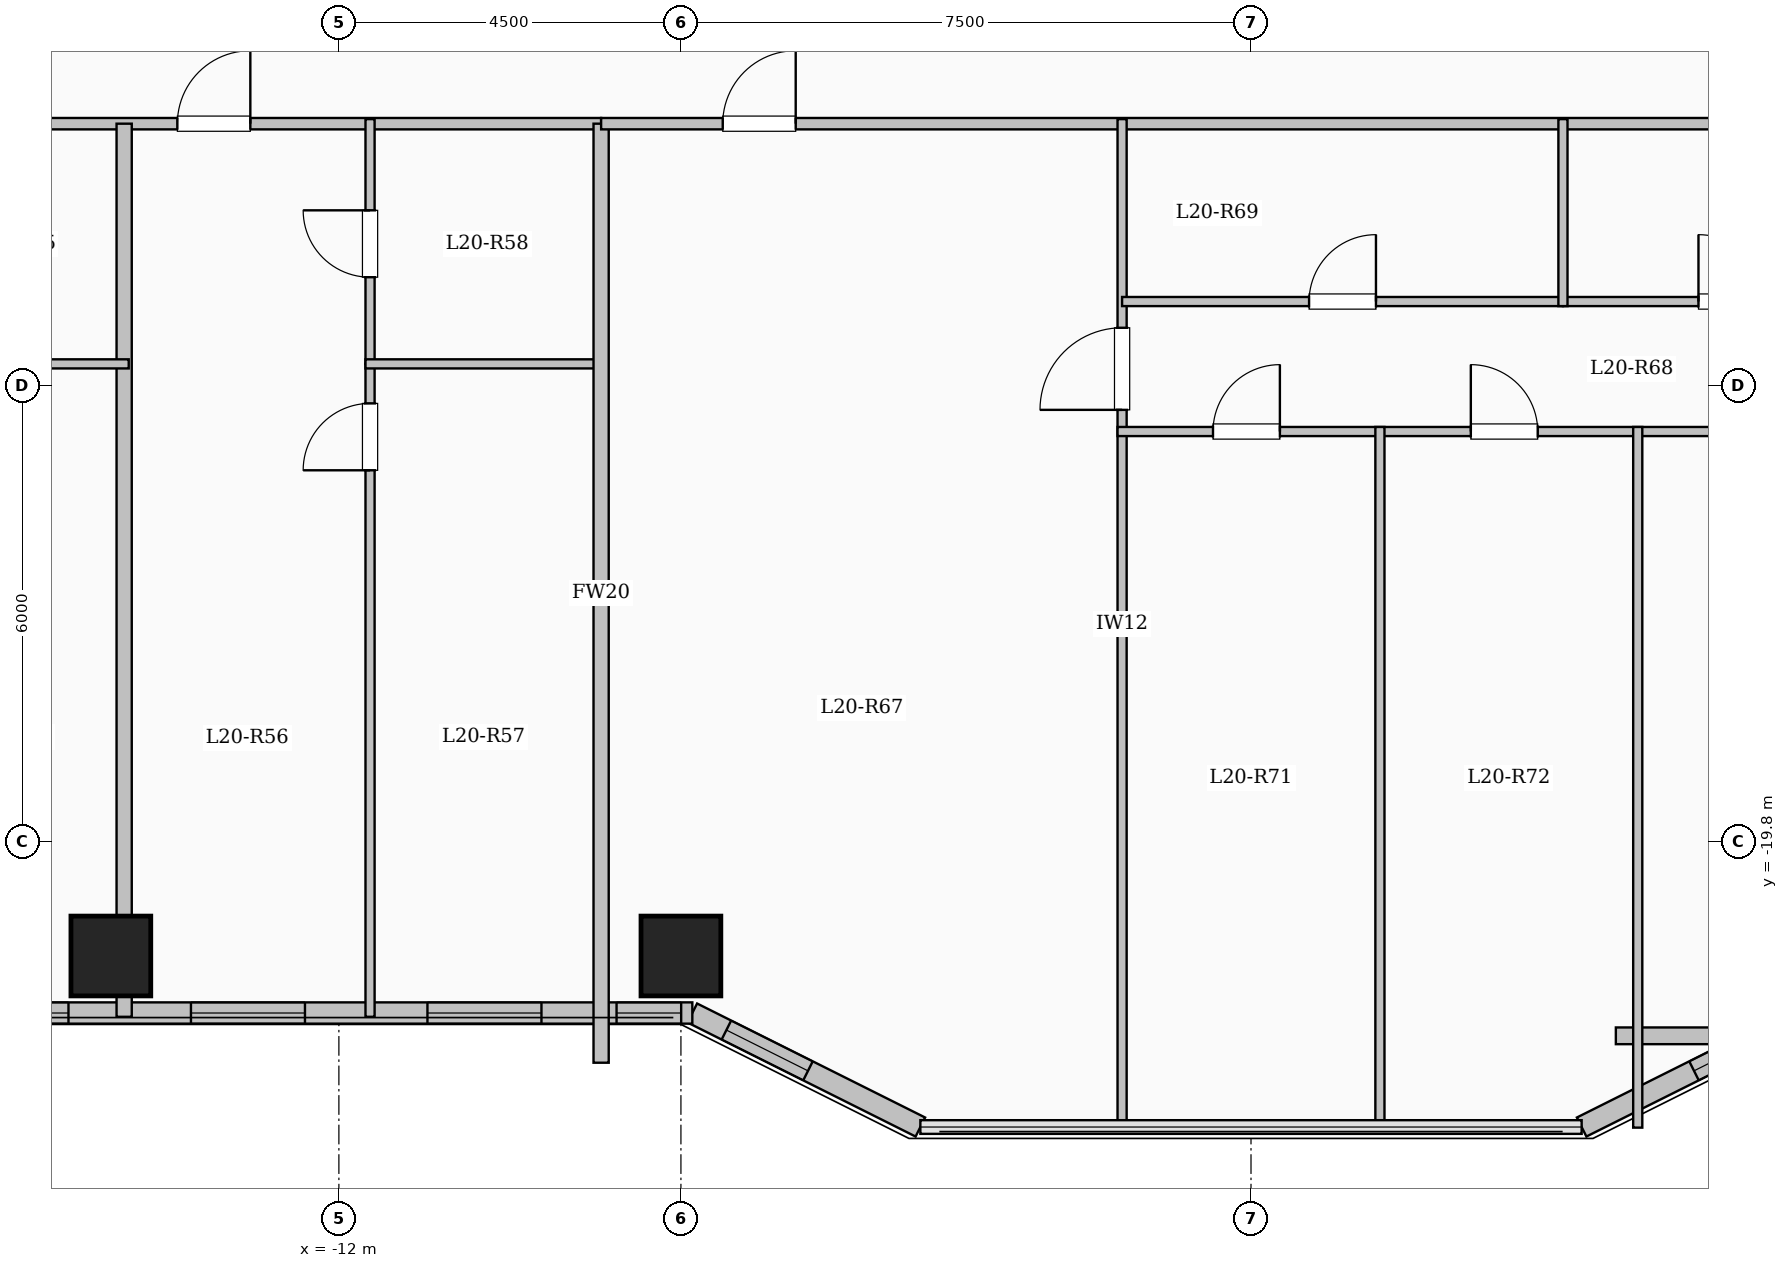
"""IFC4 building model, lengths in metres.
Left out: names, types, materials, properties, quantities, classifications, styles, units other than length and angle.
Written with IfcOpenShell. Run it as: python <this file> out.ifc"""

import sys

from ifc_helpers import new_model, si_unit, direction, frame, frame_2d, origin, origin_2d, place, context, subcontext, project, spatial, rectangle, extrude, element, fill, save


model = new_model("IFC4")
c1 = context("Model", 3, precision=1e-05, world=origin(), true_north=direction((0.0, 1.0)))
c2 = subcontext(c1, "Body", "Model", "MODEL_VIEW")
j1 = project(units=[si_unit("LENGTHUNIT", "METRE"), si_unit("PLANEANGLEUNIT", "RADIAN")], contexts=[c1])
p1 = place(None, origin())
s1 = spatial("IfcSite", under=j1, at=p1, CompositionType="ELEMENT")
p2 = place(p1, origin())
s2 = spatial("IfcBuilding", under=s1, at=p2, CompositionType="ELEMENT")
p3 = place(p2, frame((0.0, 0.0, 78.3)))
s3 = spatial("IfcBuildingStorey", under=s2, at=p3, CompositionType="ELEMENT", Elevation=78.3)
for number, where, z_axis, x_axis in (
    (1, (-15.0, -21.3, 0.0), (0.0, 0.0, 1.0), (1.0, 0.0, 0.0)),
    (2, (-7.5, -21.3, 0.0), (0.0, 0.0, 1.0), (1.0, 0.0, 0.0)),
):
    element("IfcColumn", number, at=place(p3, frame(where, z_axis=z_axis, x_axis=x_axis)), inside=s3, PredefinedType="COLUMN", context=c2, shape_type="SweptSolid", body=[
        extrude(rectangle(XDim=1.05, YDim=1.05, at=origin_2d()), origin(), (0.0, 0.0, 1.0), 3.35),
    ])
p4 = place(p3, frame((7.35, -22.05, 0.0), z_axis=(0.0, 0.0, 1.0), x_axis=(-0.894427191, -0.4472135955, 0.0)))
e3 = element("IfcWall", 3, at=p4, inside=s3, PredefinedType="SOLIDWALL", context=c2, shape_type="SweptSolid", body=[
    extrude(rectangle(XDim=3.354, YDim=0.28, at=frame_2d((1.677, 0.0))), origin(), (0.0, 0.0, 1.0), 3.1),
])
p5 = place(p4, frame((0.501, 0.0, 0.95)))
e4 = element("IfcOpeningElement", 4, at=p5, cuts=e3, PredefinedType="OPENING", context=c2, shape_type="SweptSolid", body=[
    extrude(rectangle(XDim=1.2, YDim=1.5, at=frame_2d((0.6, 0.75))), frame((0.0, 0.15, 0.0), z_axis=(0.0, -1.0, 0.0), x_axis=(1.0, 0.0, 0.0)), (0.0, 0.0, 1.0), 0.3),
])
p6 = place(p3, frame((-4.35, -23.55, 0.0), z_axis=(0.0, 0.0, 1.0), x_axis=(-0.894427191, 0.4472135955, 0.0)))
e5 = element("IfcWall", 5, at=p6, inside=s3, PredefinedType="SOLIDWALL", context=c2, shape_type="SweptSolid", body=[
    extrude(rectangle(XDim=3.354, YDim=0.28, at=frame_2d((1.677, 0.0))), origin(), (0.0, 0.0, 1.0), 3.1),
])
p7 = place(p6, frame((1.653, 0.0, 0.95)))
e6 = element("IfcOpeningElement", 6, at=p7, cuts=e5, PredefinedType="OPENING", context=c2, shape_type="SweptSolid", body=[
    extrude(rectangle(XDim=1.2, YDim=1.5, at=frame_2d((0.6, 0.75))), frame((0.0, 0.15, 0.0), z_axis=(0.0, -1.0, 0.0), x_axis=(1.0, 0.0, 0.0)), (0.0, 0.0, 1.0), 0.3),
])
p8 = place(p3, frame((-7.35, -22.05, 0.0), z_axis=(0.0, 0.0, 1.0), x_axis=(-1.0, 0.0, 0.0)))
e7 = element("IfcWall", 7, at=p8, inside=s3, PredefinedType="SOLIDWALL", context=c2, shape_type="SweptSolid", body=[
    extrude(rectangle(XDim=13.8, YDim=0.28, at=frame_2d((6.9, 0.0))), origin(), (0.0, 0.0, 1.0), 3.1),
])
p9 = place(p8, frame((0.147, 0.0, 0.95)))
e8 = element("IfcOpeningElement", 8, at=p9, cuts=e7, PredefinedType="OPENING", context=c2, shape_type="SweptSolid", body=[
    extrude(rectangle(XDim=0.85, YDim=1.5, at=frame_2d((0.425, 0.75))), frame((0.0, 0.15, 0.0), z_axis=(0.0, -1.0, 0.0), x_axis=(1.0, 0.0, 0.0)), (0.0, 0.0, 1.0), 0.3),
])
p10 = place(p8, frame((1.985, 0.0, 0.9)))
e9 = element("IfcOpeningElement", 9, at=p10, cuts=e7, PredefinedType="OPENING", context=c2, shape_type="SweptSolid", body=[
    extrude(rectangle(XDim=1.5, YDim=1.65, at=frame_2d((0.75, 0.825))), frame((0.0, 0.15, 0.0), z_axis=(0.0, -1.0, 0.0), x_axis=(1.0, 0.0, 0.0)), (0.0, 0.0, 1.0), 0.3),
])
p11 = place(p8, frame((5.096, 0.0, 0.9)))
e10 = element("IfcOpeningElement", 10, at=p11, cuts=e7, PredefinedType="OPENING", context=c2, shape_type="SweptSolid", body=[
    extrude(rectangle(XDim=1.5, YDim=1.65, at=frame_2d((0.75, 0.825))), frame((0.0, 0.15, 0.0), z_axis=(0.0, -1.0, 0.0), x_axis=(1.0, 0.0, 0.0)), (0.0, 0.0, 1.0), 0.3),
])
p12 = place(p8, frame((8.208, 0.0, 0.9)))
e11 = element("IfcOpeningElement", 11, at=p12, cuts=e7, PredefinedType="OPENING", context=c2, shape_type="SweptSolid", body=[
    extrude(rectangle(XDim=1.5, YDim=1.65, at=frame_2d((0.75, 0.825))), frame((0.0, 0.15, 0.0), z_axis=(0.0, -1.0, 0.0), x_axis=(1.0, 0.0, 0.0)), (0.0, 0.0, 1.0), 0.3),
])
p13 = place(p8, frame((11.344, 0.0, 0.9)))
e12 = element("IfcOpeningElement", 12, at=p13, cuts=e7, PredefinedType="OPENING", context=c2, shape_type="SweptSolid", body=[
    extrude(rectangle(XDim=1.5, YDim=1.65, at=frame_2d((0.75, 0.825))), frame((0.0, 0.15, 0.0), z_axis=(0.0, -1.0, 0.0), x_axis=(1.0, 0.0, 0.0)), (0.0, 0.0, 1.0), 0.3),
])
p14 = place(p3, frame((4.8, -22.35, 0.0), z_axis=(0.0, 0.0, 1.0), x_axis=(1.0, 0.0, 0.0)))
e13 = element("IfcWall", 13, at=p14, inside=s3, PredefinedType="PARAPET", context=c2, shape_type="SweptSolid", body=[
    extrude(rectangle(XDim=2.0, YDim=0.22, at=frame_2d((1.0, 0.0))), origin(), (0.0, 0.0, 1.0), 0.85),
])
p15 = place(p3, frame((-21.05, -10.35, 0.0), z_axis=(0.0, 0.0, 1.0), x_axis=(1.0, 0.0, 0.0)))
e14 = element("IfcWall", 14, at=p15, inside=s3, PredefinedType="PARTITIONING", context=c2, shape_type="SweptSolid", body=[
    extrude(rectangle(XDim=12.5, YDim=0.15, at=frame_2d((6.25, 0.0))), origin(), (0.0, 0.0, 1.0), 3.1),
])
p16 = place(p15, frame((0.7, 0.0, 0.0)))
e15 = element("IfcOpeningElement", 15, at=p16, cuts=e14, PredefinedType="OPENING", context=c2, shape_type="SweptSolid", body=[
    extrude(rectangle(XDim=0.96, YDim=2.15, at=frame_2d((0.48, 1.075))), frame((0.0, 0.085, 0.0), z_axis=(0.0, -1.0, 0.0), x_axis=(1.0, 0.0, 0.0)), (0.0, 0.0, 1.0), 0.17),
])
p17 = place(p15, frame((6.925, 0.0, 0.0)))
e16 = element("IfcOpeningElement", 16, at=p17, cuts=e14, PredefinedType="OPENING", context=c2, shape_type="SweptSolid", body=[
    extrude(rectangle(XDim=0.96, YDim=2.15, at=frame_2d((0.48, 1.075))), frame((0.0, 0.085, 0.0), z_axis=(0.0, -1.0, 0.0), x_axis=(1.0, 0.0, 0.0)), (0.0, 0.0, 1.0), 0.17),
])
p18 = place(p3, frame((-14.825, -22.1, 0.0), z_axis=(0.0, 0.0, 1.0), x_axis=(0.0, 1.0, 0.0)))
e17 = element("IfcWall", 17, at=p18, inside=s3, PredefinedType="SOLIDWALL", context=c2, shape_type="SweptSolid", body=[
    extrude(rectangle(XDim=11.75, YDim=0.2, at=frame_2d((5.875, 0.0))), origin(), (0.0, 0.0, 1.0), 2.435),
])
p19 = place(p3, frame((-17.875, -13.51, 0.0), z_axis=(0.0, 0.0, 1.0), x_axis=(1.0, 0.0, 0.0)))
e18 = element("IfcWall", 18, at=p19, inside=s3, PredefinedType="PARTITIONING", context=c2, shape_type="SweptSolid", body=[
    extrude(rectangle(XDim=3.11, YDim=0.12, at=frame_2d((1.555, 0.0))), origin(), (0.0, 0.0, 1.0), 3.1),
])
p20 = place(p3, frame((-11.59, -22.1, 0.0), z_axis=(0.0, 0.0, 1.0), x_axis=(0.0, 1.0, 0.0)))
e19 = element("IfcWall", 19, at=p20, inside=s3, PredefinedType="PARTITIONING", context=c2, shape_type="SweptSolid", body=[
    extrude(rectangle(XDim=8.59, YDim=0.12, at=frame_2d((4.295, 0.0))), origin(), (0.0, 0.0, 1.0), 3.1),
])
p21 = place(p20, frame((7.19, 0.0, 0.0)))
e20 = element("IfcOpeningElement", 20, at=p21, cuts=e19, PredefinedType="OPENING", context=c2, shape_type="SweptSolid", body=[
    extrude(rectangle(XDim=0.88, YDim=2.1, at=frame_2d((0.44, 1.05))), frame((0.0, 0.07, 0.0), z_axis=(0.0, -1.0, 0.0), x_axis=(1.0, 0.0, 0.0)), (0.0, 0.0, 1.0), 0.14),
])
p22 = place(p3, frame((-11.59, -13.51, 0.0), z_axis=(0.0, 0.0, 1.0), x_axis=(0.0, 1.0, 0.0)))
e21 = element("IfcWall", 21, at=p22, inside=s3, PredefinedType="PARTITIONING", context=c2, shape_type="SweptSolid", body=[
    extrude(rectangle(XDim=3.22, YDim=0.12, at=frame_2d((1.61, 0.0))), origin(), (0.0, 0.0, 1.0), 3.1),
])
p23 = place(p22, frame((1.14, 0.0, 0.0)))
e22 = element("IfcOpeningElement", 22, at=p23, cuts=e21, PredefinedType="OPENING", context=c2, shape_type="SweptSolid", body=[
    extrude(rectangle(XDim=0.88, YDim=2.1, at=frame_2d((0.44, 1.05))), frame((0.0, 0.07, 0.0), z_axis=(0.0, -1.0, 0.0), x_axis=(1.0, 0.0, 0.0)), (0.0, 0.0, 1.0), 0.14),
])
p24 = place(p3, frame((-11.65, -13.51, 0.0), z_axis=(0.0, 0.0, 1.0), x_axis=(1.0, 0.0, 0.0)))
e23 = element("IfcWall", 23, at=p24, inside=s3, PredefinedType="PARTITIONING", context=c2, shape_type="SweptSolid", body=[
    extrude(rectangle(XDim=3.11, YDim=0.12, at=frame_2d((1.555, 0.0))), origin(), (0.0, 0.0, 1.0), 3.1),
])
p25 = place(p3, frame((-8.55, -22.704, 0.0), z_axis=(0.0, 0.0, 1.0), x_axis=(0.0, 1.0, 0.0)))
e24 = element("IfcWall", 24, at=p25, inside=s3, PredefinedType="SOLIDWALL", context=c2, shape_type="SweptSolid", body=[
    extrude(rectangle(XDim=12.354, YDim=0.2, at=frame_2d((6.177, 0.0))), origin(), (0.0, 0.0, 1.0), 3.1),
])
p26 = place(p3, frame((-8.55, -10.35, 0.0), z_axis=(0.0, 0.0, 1.0), x_axis=(1.0, 0.0, 0.0)))
e25 = element("IfcWall", 25, at=p26, inside=s3, PredefinedType="PARTITIONING", context=c2, shape_type="SweptSolid", body=[
    extrude(rectangle(XDim=17.1, YDim=0.15, at=frame_2d((8.55, 0.0))), origin(), (0.0, 0.0, 1.0), 3.1),
])
p27 = place(p26, frame((1.6, 0.0, 0.0)))
e26 = element("IfcOpeningElement", 26, at=p27, cuts=e25, PredefinedType="OPENING", context=c2, shape_type="SweptSolid", body=[
    extrude(rectangle(XDim=0.96, YDim=2.15, at=frame_2d((0.48, 1.075))), frame((0.0, 0.085, 0.0), z_axis=(0.0, -1.0, 0.0), x_axis=(1.0, 0.0, 0.0)), (0.0, 0.0, 1.0), 0.17),
])
p28 = place(p3, frame((-1.696, -23.58, 0.0), z_axis=(0.0, 0.0, 1.0), x_axis=(0.0, 1.0, 0.0)))
e27 = element("IfcWall", 27, at=p28, inside=s3, PredefinedType="PARTITIONING", context=c2, shape_type="SweptSolid", body=[
    extrude(rectangle(XDim=13.29, YDim=0.12, at=frame_2d((6.645, 0.0))), origin(), (0.0, 0.0, 1.0), 3.1),
])
p29 = place(p28, frame((9.465, 0.0, 0.0)))
e28 = element("IfcOpeningElement", 28, at=p29, cuts=e27, PredefinedType="OPENING", context=c2, shape_type="SweptSolid", body=[
    extrude(rectangle(XDim=1.08, YDim=2.15, at=frame_2d((0.54, 1.075))), frame((0.0, 0.07, 0.0), z_axis=(0.0, -1.0, 0.0), x_axis=(1.0, 0.0, 0.0)), (0.0, 0.0, 1.0), 0.14),
])
p30 = place(p3, frame((-1.696, -12.69, 0.0), z_axis=(0.0, 0.0, 1.0), x_axis=(1.0, 0.0, 0.0)))
e29 = element("IfcWall", 29, at=p30, inside=s3, PredefinedType="PARTITIONING", context=c2, shape_type="SweptSolid", body=[
    extrude(rectangle(XDim=5.8, YDim=0.12, at=frame_2d((2.9, 0.0))), origin(), (0.0, 0.0, 1.0), 2.635),
])
p31 = place(p30, frame((2.46, 0.0, 0.0)))
e30 = element("IfcOpeningElement", 30, at=p31, cuts=e29, PredefinedType="OPENING", context=c2, shape_type="SweptSolid", body=[
    extrude(rectangle(XDim=0.88, YDim=2.1, at=frame_2d((0.44, 1.05))), frame((0.0, 0.07, 0.0), z_axis=(0.0, -1.0, 0.0), x_axis=(1.0, 0.0, 0.0)), (0.0, 0.0, 1.0), 0.14),
])
p32 = place(p3, frame((4.104, -12.69, 0.0), z_axis=(0.0, 0.0, 1.0), x_axis=(1.0, 0.0, 0.0)))
e31 = element("IfcWall", 31, at=p32, inside=s3, PredefinedType="PARTITIONING", context=c2, shape_type="SweptSolid", body=[
    extrude(rectangle(XDim=4.446, YDim=0.12, at=frame_2d((2.223, 0.0))), origin(), (0.0, 0.0, 1.0), 2.635),
])
p33 = place(p32, frame((1.783, 0.0, 0.0)))
e32 = element("IfcOpeningElement", 32, at=p33, cuts=e31, PredefinedType="OPENING", context=c2, shape_type="SweptSolid", body=[
    extrude(rectangle(XDim=0.88, YDim=2.1, at=frame_2d((0.44, 1.05))), frame((0.0, 0.07, 0.0), z_axis=(0.0, -1.0, 0.0), x_axis=(1.0, 0.0, 0.0)), (0.0, 0.0, 1.0), 0.14),
])
p34 = place(p3, frame((-1.756, -14.4, 0.0), z_axis=(0.0, 0.0, 1.0), x_axis=(1.0, 0.0, 0.0)))
e33 = element("IfcWall", 33, at=p34, inside=s3, PredefinedType="PARTITIONING", context=c2, shape_type="SweptSolid", body=[
    extrude(rectangle(XDim=10.366, YDim=0.12, at=frame_2d((5.183, 0.0))), origin(), (0.0, 0.0, 1.0), 2.635),
])
p35 = place(p34, frame((1.256, 0.0, 0.0)))
e34 = element("IfcOpeningElement", 34, at=p35, cuts=e33, PredefinedType="OPENING", context=c2, shape_type="SweptSolid", body=[
    extrude(rectangle(XDim=0.88, YDim=2.1, at=frame_2d((0.44, 1.05))), frame((0.0, 0.07, 0.0), z_axis=(0.0, -1.0, 0.0), x_axis=(1.0, 0.0, 0.0)), (0.0, 0.0, 1.0), 0.14),
])
p36 = place(p34, frame((4.648, 0.0, 0.0)))
e35 = element("IfcOpeningElement", 35, at=p36, cuts=e33, PredefinedType="OPENING", context=c2, shape_type="SweptSolid", body=[
    extrude(rectangle(XDim=0.88, YDim=2.1, at=frame_2d((0.44, 1.05))), frame((0.0, 0.07, 0.0), z_axis=(0.0, -1.0, 0.0), x_axis=(1.0, 0.0, 0.0)), (0.0, 0.0, 1.0), 0.14),
])
p37 = place(p34, frame((8.04, 0.0, 0.0)))
e36 = element("IfcOpeningElement", 36, at=p37, cuts=e33, PredefinedType="OPENING", context=c2, shape_type="SweptSolid", body=[
    extrude(rectangle(XDim=0.88, YDim=2.1, at=frame_2d((0.44, 1.05))), frame((0.0, 0.07, 0.0), z_axis=(0.0, -1.0, 0.0), x_axis=(1.0, 0.0, 0.0)), (0.0, 0.0, 1.0), 0.14),
])
p38 = place(p3, frame((4.104, -12.75, 0.0), z_axis=(0.0, 0.0, 1.0), x_axis=(0.0, 1.0, 0.0)))
e37 = element("IfcWall", 37, at=p38, inside=s3, PredefinedType="PARTITIONING", context=c2, shape_type="SweptSolid", body=[
    extrude(rectangle(XDim=2.46, YDim=0.12, at=frame_2d((1.23, 0.0))), origin(), (0.0, 0.0, 1.0), 3.1),
])
p39 = place(p3, frame((1.696, -23.58, 0.0), z_axis=(0.0, 0.0, 1.0), x_axis=(0.0, 1.0, 0.0)))
e38 = element("IfcWall", 38, at=p39, inside=s3, PredefinedType="PARTITIONING", context=c2, shape_type="SweptSolid", body=[
    extrude(rectangle(XDim=9.24, YDim=0.12, at=frame_2d((4.62, 0.0))), origin(), (0.0, 0.0, 1.0), 3.1),
])
p40 = place(p3, frame((5.088, -23.558, 0.0), z_axis=(0.0, 0.0, 1.0), x_axis=(0.0, 1.0, 0.0)))
e39 = element("IfcWall", 39, at=p40, inside=s3, PredefinedType="PARTITIONING", context=c2, shape_type="SweptSolid", body=[
    extrude(rectangle(XDim=9.218, YDim=0.12, at=frame_2d((4.609, 0.0))), origin(), (0.0, 0.0, 1.0), 3.1),
])
p41 = place(p5, origin())
e40 = element("IfcWindow", 40, at=p41, inside=s3, PartitioningType="SINGLE_PANEL", PredefinedType="WINDOW", context=c2, shape_type="SweptSolid", body=[
    extrude(rectangle(XDim=1.2, YDim=1.5, at=frame_2d((0.6, 0.75))), frame((0.0, 0.03, 0.0), z_axis=(0.0, -1.0, 0.0), x_axis=(1.0, 0.0, 0.0)), (0.0, 0.0, 1.0), 0.06),
])
fill(e4, e40)
p42 = place(p7, origin())
e41 = element("IfcWindow", 41, at=p42, inside=s3, PartitioningType="SINGLE_PANEL", PredefinedType="WINDOW", context=c2, shape_type="SweptSolid", body=[
    extrude(rectangle(XDim=1.2, YDim=1.5, at=frame_2d((0.6, 0.75))), frame((0.0, 0.03, 0.0), z_axis=(0.0, -1.0, 0.0), x_axis=(1.0, 0.0, 0.0)), (0.0, 0.0, 1.0), 0.06),
])
fill(e6, e41)
p43 = place(p9, origin())
e42 = element("IfcWindow", 42, at=p43, inside=s3, PartitioningType="SINGLE_PANEL", PredefinedType="WINDOW", context=c2, shape_type="SweptSolid", body=[
    extrude(rectangle(XDim=0.85, YDim=1.5, at=frame_2d((0.425, 0.75))), frame((0.0, 0.03, 0.0), z_axis=(0.0, -1.0, 0.0), x_axis=(1.0, 0.0, 0.0)), (0.0, 0.0, 1.0), 0.06),
])
fill(e8, e42)
p44 = place(p10, origin())
e43 = element("IfcWindow", 43, at=p44, inside=s3, PartitioningType="SINGLE_PANEL", PredefinedType="WINDOW", context=c2, shape_type="SweptSolid", body=[
    extrude(rectangle(XDim=1.5, YDim=1.65, at=frame_2d((0.75, 0.825))), frame((0.0, 0.03, 0.0), z_axis=(0.0, -1.0, 0.0), x_axis=(1.0, 0.0, 0.0)), (0.0, 0.0, 1.0), 0.06),
])
fill(e9, e43)
p45 = place(p11, origin())
e44 = element("IfcWindow", 44, at=p45, inside=s3, PartitioningType="SINGLE_PANEL", PredefinedType="WINDOW", context=c2, shape_type="SweptSolid", body=[
    extrude(rectangle(XDim=1.5, YDim=1.65, at=frame_2d((0.75, 0.825))), frame((0.0, 0.03, 0.0), z_axis=(0.0, -1.0, 0.0), x_axis=(1.0, 0.0, 0.0)), (0.0, 0.0, 1.0), 0.06),
])
fill(e10, e44)
p46 = place(p12, origin())
e45 = element("IfcWindow", 45, at=p46, inside=s3, PartitioningType="SINGLE_PANEL", PredefinedType="WINDOW", context=c2, shape_type="SweptSolid", body=[
    extrude(rectangle(XDim=1.5, YDim=1.65, at=frame_2d((0.75, 0.825))), frame((0.0, 0.03, 0.0), z_axis=(0.0, -1.0, 0.0), x_axis=(1.0, 0.0, 0.0)), (0.0, 0.0, 1.0), 0.06),
])
fill(e11, e45)
p47 = place(p17, origin())
e46 = element("IfcDoor", 46, at=p47, inside=s3, OperationType="SINGLE_SWING_RIGHT", PredefinedType="DOOR", context=c2, shape_type="SweptSolid", body=[
    extrude(rectangle(XDim=0.96, YDim=2.15, at=frame_2d((0.48, 1.075))), frame((0.0, 0.025, 0.0), z_axis=(0.0, -1.0, 0.0), x_axis=(1.0, 0.0, 0.0)), (0.0, 0.0, 1.0), 0.05),
])
fill(e16, e46)
p48 = place(p21, origin())
e47 = element("IfcDoor", 47, at=p48, inside=s3, OperationType="SINGLE_SWING_LEFT", PredefinedType="DOOR", context=c2, shape_type="SweptSolid", body=[
    extrude(rectangle(XDim=0.88, YDim=2.1, at=frame_2d((0.44, 1.05))), frame((0.0, 0.025, 0.0), z_axis=(0.0, -1.0, 0.0), x_axis=(1.0, 0.0, 0.0)), (0.0, 0.0, 1.0), 0.05),
])
fill(e20, e47)
p49 = place(p23, origin())
e48 = element("IfcDoor", 48, at=p49, inside=s3, OperationType="SINGLE_SWING_RIGHT", PredefinedType="DOOR", context=c2, shape_type="SweptSolid", body=[
    extrude(rectangle(XDim=0.88, YDim=2.1, at=frame_2d((0.44, 1.05))), frame((0.0, 0.025, 0.0), z_axis=(0.0, -1.0, 0.0), x_axis=(1.0, 0.0, 0.0)), (0.0, 0.0, 1.0), 0.05),
])
fill(e22, e48)
p50 = place(p27, origin())
e49 = element("IfcDoor", 49, at=p50, inside=s3, OperationType="SINGLE_SWING_RIGHT", PredefinedType="DOOR", context=c2, shape_type="SweptSolid", body=[
    extrude(rectangle(XDim=0.96, YDim=2.15, at=frame_2d((0.48, 1.075))), frame((0.0, 0.025, 0.0), z_axis=(0.0, -1.0, 0.0), x_axis=(1.0, 0.0, 0.0)), (0.0, 0.0, 1.0), 0.05),
])
fill(e26, e49)
p51 = place(p29, origin())
e50 = element("IfcDoor", 50, at=p51, inside=s3, OperationType="SINGLE_SWING_LEFT", PredefinedType="DOOR", context=c2, shape_type="SweptSolid", body=[
    extrude(rectangle(XDim=1.08, YDim=2.15, at=frame_2d((0.54, 1.075))), frame((0.0, 0.025, 0.0), z_axis=(0.0, -1.0, 0.0), x_axis=(1.0, 0.0, 0.0)), (0.0, 0.0, 1.0), 0.05),
])
fill(e28, e50)
p52 = place(p31, origin())
e51 = element("IfcDoor", 51, at=p52, inside=s3, OperationType="SINGLE_SWING_RIGHT", PredefinedType="DOOR", context=c2, shape_type="SweptSolid", body=[
    extrude(rectangle(XDim=0.88, YDim=2.1, at=frame_2d((0.44, 1.05))), frame((0.0, 0.025, 0.0), z_axis=(0.0, -1.0, 0.0), x_axis=(1.0, 0.0, 0.0)), (0.0, 0.0, 1.0), 0.05),
])
fill(e30, e51)
p53 = place(p33, origin())
e52 = element("IfcDoor", 52, at=p53, inside=s3, OperationType="SINGLE_SWING_LEFT", PredefinedType="DOOR", context=c2, shape_type="SweptSolid", body=[
    extrude(rectangle(XDim=0.88, YDim=2.1, at=frame_2d((0.44, 1.05))), frame((0.0, 0.025, 0.0), z_axis=(0.0, -1.0, 0.0), x_axis=(1.0, 0.0, 0.0)), (0.0, 0.0, 1.0), 0.05),
])
fill(e32, e52)
p54 = place(p35, origin())
e53 = element("IfcDoor", 53, at=p54, inside=s3, OperationType="SINGLE_SWING_RIGHT", PredefinedType="DOOR", context=c2, shape_type="SweptSolid", body=[
    extrude(rectangle(XDim=0.88, YDim=2.1, at=frame_2d((0.44, 1.05))), frame((0.0, 0.025, 0.0), z_axis=(0.0, -1.0, 0.0), x_axis=(1.0, 0.0, 0.0)), (0.0, 0.0, 1.0), 0.05),
])
fill(e34, e53)
p55 = place(p36, origin())
e54 = element("IfcDoor", 54, at=p55, inside=s3, OperationType="SINGLE_SWING_LEFT", PredefinedType="DOOR", context=c2, shape_type="SweptSolid", body=[
    extrude(rectangle(XDim=0.88, YDim=2.1, at=frame_2d((0.44, 1.05))), frame((0.0, 0.025, 0.0), z_axis=(0.0, -1.0, 0.0), x_axis=(1.0, 0.0, 0.0)), (0.0, 0.0, 1.0), 0.05),
])
fill(e35, e54)
save(model, sys.argv[1])
